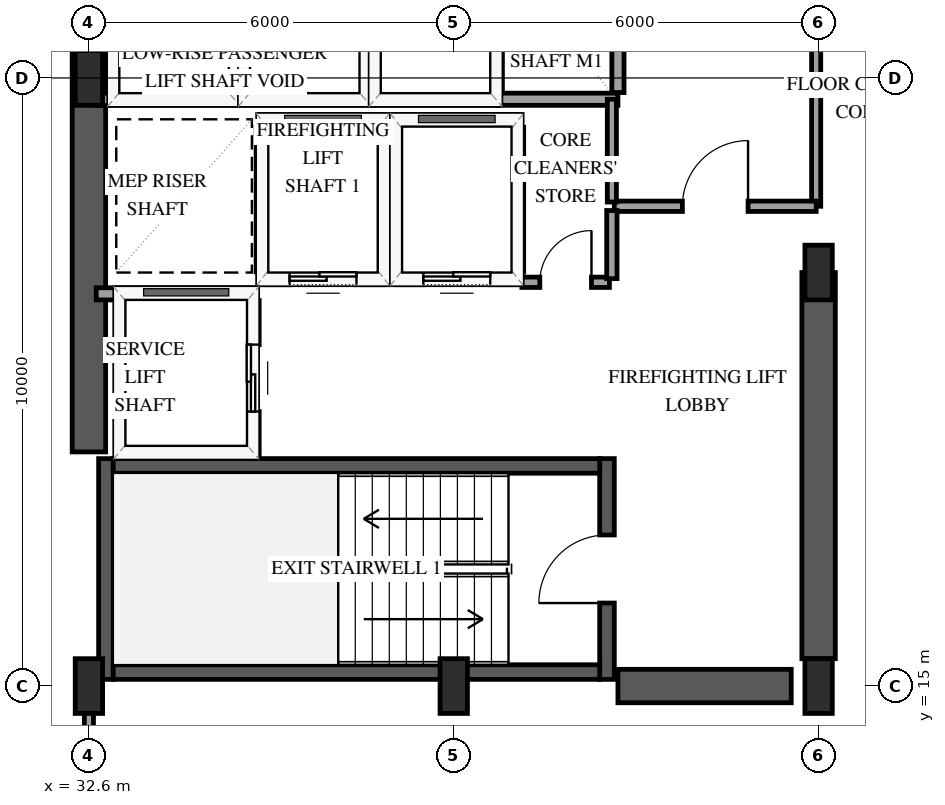
"""IFC4 building model, lengths in metres.
Left out: names, types, materials, properties, quantities, classifications, styles, units other than length and angle.
Written with IfcOpenShell. Run it as: python <this file> out.ifc"""

import sys

from ifc_helpers import new_model, si_unit, direction, frame, frame_2d, origin, origin_2d, place, context, subcontext, project, spatial, rectangle, extrude, element, fill, save


model = new_model("IFC4")
c1 = context("Model", 3, precision=1e-05, world=origin(), true_north=direction((0.0, 1.0)))
c2 = subcontext(c1, "Body", "Model", "MODEL_VIEW")
j1 = project(units=[si_unit("LENGTHUNIT", "METRE"), si_unit("PLANEANGLEUNIT", "RADIAN")], contexts=[c1])
p1 = place(None, origin())
s1 = spatial("IfcSite", under=j1, at=p1, CompositionType="ELEMENT")
p2 = place(p1, origin())
s2 = spatial("IfcBuilding", under=s1, at=p2, CompositionType="ELEMENT")
p3 = place(p2, frame((0.0, 0.0, 126.4)))
s3 = spatial("IfcBuildingStorey", under=s2, at=p3, CompositionType="ELEMENT", Elevation=126.4)
p4 = place(p3, frame((32.88, 15.11, 0.0), z_axis=(0.0, 0.0, 1.0), x_axis=(0.0, 1.0, 0.0)))
e1 = element("IfcWall", 1, at=p4, inside=s3, PredefinedType="SHEAR", context=c2, shape_type="SweptSolid", body=[
    extrude(rectangle(XDim=3.63, YDim=0.24, at=frame_2d((1.815, 0.0))), origin(), (0.0, 0.0, 1.0), 3.9),
])
p5 = place(p3, frame((41.12, 15.11, 0.0), z_axis=(0.0, 0.0, 1.0), x_axis=(0.0, 1.0, 0.0)))
e2 = element("IfcWall", 2, at=p5, inside=s3, PredefinedType="SHEAR", context=c2, shape_type="SweptSolid", body=[
    extrude(rectangle(XDim=3.63, YDim=0.24, at=frame_2d((1.815, 0.0))), origin(), (0.0, 0.0, 1.0), 3.9),
])
p6 = place(p5, frame((1.255, 0.0, 0.0)))
e3 = element("IfcOpeningElement", 3, at=p6, cuts=e2, PredefinedType="OPENING", context=c2, shape_type="SweptSolid", body=[
    extrude(rectangle(XDim=1.12, YDim=2.15, at=frame_2d((0.56, 1.075))), frame((0.0, 0.13, 0.0), z_axis=(0.0, -1.0, 0.0), x_axis=(1.0, 0.0, 0.0)), (0.0, 0.0, 1.0), 0.26),
])
for number, where, z_axis, x_axis in (
    (4, (33.0, 15.23, 0.0), (0.0, 0.0, 1.0), (1.0, 0.0, 0.0)),
    (5, (33.0, 18.62, 0.0), (0.0, 0.0, 1.0), (1.0, 0.0, 0.0)),
):
    element("IfcWall", number, at=place(p3, frame(where, z_axis=z_axis, x_axis=x_axis)), inside=s3, PredefinedType="SHEAR", context=c2, shape_type="SweptSolid", body=[
        extrude(rectangle(XDim=8.0, YDim=0.24, at=frame_2d((4.0, 0.0))), origin(), (0.0, 0.0, 1.0), 3.9),
    ])
p7 = place(p3, frame((32.6, 18.85, 0.0), z_axis=(0.0, 0.0, 1.0), x_axis=(0.0, 1.0, 0.0)))
e6 = element("IfcWall", 6, at=p7, inside=s3, PredefinedType="SHEAR", context=c2, shape_type="SweptSolid", body=[
    extrude(rectangle(XDim=12.3, YDim=0.55, at=frame_2d((6.15, 0.0))), origin(), (0.0, 0.0, 1.0), 3.9),
])
p8 = place(p3, frame((41.3, 15.0, 0.0), z_axis=(0.0, 0.0, 1.0), x_axis=(1.0, 0.0, 0.0)))
e7 = element("IfcWall", 7, at=p8, inside=s3, PredefinedType="SHEAR", context=c2, shape_type="SweptSolid", body=[
    extrude(rectangle(XDim=2.85, YDim=0.55, at=frame_2d((1.425, 0.0))), origin(), (0.0, 0.0, 1.0), 3.9),
])
p9 = place(p3, frame((44.6, 15.45, 0.0), z_axis=(0.0, 0.0, 1.0), x_axis=(0.0, 1.0, 0.0)))
e8 = element("IfcWall", 8, at=p9, inside=s3, PredefinedType="SHEAR", context=c2, shape_type="SweptSolid", body=[
    extrude(rectangle(XDim=6.35, YDim=0.55, at=frame_2d((3.175, 0.0))), origin(), (0.0, 0.0, 1.0), 3.9),
])
for number, where, z_axis, x_axis in (
    (9, (32.6, 15.0, 0.0), (0.0, 0.0, 1.0), (1.0, 0.0, 0.0)),
    (10, (32.6, 25.0, 0.0), (0.0, 0.0, 1.0), (1.0, 0.0, 0.0)),
    (11, (38.6, 15.0, 0.0), (0.0, 0.0, 1.0), (1.0, 0.0, 0.0)),
    (12, (44.6, 15.0, 0.0), (0.0, 0.0, 1.0), (1.0, 0.0, 0.0)),
    (13, (44.6, 21.8, 0.0), (0.0, 0.0, 1.0), (1.0, 0.0, 0.0)),
):
    element("IfcColumn", number, at=place(p3, frame(where, z_axis=z_axis, x_axis=x_axis)), inside=s3, PredefinedType="PILASTER", context=c2, shape_type="SweptSolid", body=[
        extrude(rectangle(XDim=0.45, YDim=0.9, at=origin_2d()), origin(), (0.0, 0.0, 1.0), 3.9),
    ])
p10 = place(p3, frame((35.45, 21.7, 0.0), z_axis=(0.0, 0.0, 1.0), x_axis=(1.0, 0.0, 0.0)))
e14 = element("IfcWall", 14, at=p10, inside=s3, PredefinedType="SOLIDWALL", context=c2, shape_type="SweptSolid", body=[
    extrude(rectangle(XDim=2.0, YDim=0.2, at=frame_2d((1.0, 0.0))), origin(), (0.0, 0.0, 1.0), 3.6),
])
p11 = place(p10, frame((0.45, 0.0, 0.0)))
e15 = element("IfcOpeningElement", 15, at=p11, cuts=e14, PredefinedType="OPENING", context=c2, shape_type="SweptSolid", body=[
    extrude(rectangle(XDim=1.1, YDim=2.15, at=frame_2d((0.55, 1.075))), frame((0.0, 0.11, 0.0), z_axis=(0.0, -1.0, 0.0), x_axis=(1.0, 0.0, 0.0)), (0.0, 0.0, 1.0), 0.22),
])
p12 = place(p3, frame((35.45, 24.3, 0.0), z_axis=(0.0, 0.0, 1.0), x_axis=(1.0, 0.0, 0.0)))
e16 = element("IfcWall", 16, at=p12, inside=s3, PredefinedType="SOLIDWALL", context=c2, shape_type="SweptSolid", body=[
    extrude(rectangle(XDim=2.0, YDim=0.2, at=frame_2d((1.0, 0.0))), origin(), (0.0, 0.0, 1.0), 3.6),
])
for number, where, z_axis, x_axis in (
    (17, (35.45, 21.81, 0.0), (0.0, 0.0, 1.0), (0.0, 1.0, 0.0)),
    (18, (37.45, 21.81, 0.0), (0.0, 0.0, 1.0), (0.0, 1.0, 0.0)),
):
    element("IfcWall", number, at=place(p3, frame(where, z_axis=z_axis, x_axis=x_axis)), inside=s3, PredefinedType="SOLIDWALL", context=c2, shape_type="SweptSolid", body=[
        extrude(rectangle(XDim=2.38, YDim=0.2, at=frame_2d((1.19, 0.0))), origin(), (0.0, 0.0, 1.0), 3.6),
    ])
p13 = place(p3, frame((37.65, 21.7, 0.0), z_axis=(0.0, 0.0, 1.0), x_axis=(1.0, 0.0, 0.0)))
e19 = element("IfcWall", 19, at=p13, inside=s3, PredefinedType="SOLIDWALL", context=c2, shape_type="SweptSolid", body=[
    extrude(rectangle(XDim=2.0, YDim=0.2, at=frame_2d((1.0, 0.0))), origin(), (0.0, 0.0, 1.0), 3.6),
])
p14 = place(p13, frame((0.45, 0.0, 0.0)))
e20 = element("IfcOpeningElement", 20, at=p14, cuts=e19, PredefinedType="OPENING", context=c2, shape_type="SweptSolid", body=[
    extrude(rectangle(XDim=1.1, YDim=2.15, at=frame_2d((0.55, 1.075))), frame((0.0, 0.11, 0.0), z_axis=(0.0, -1.0, 0.0), x_axis=(1.0, 0.0, 0.0)), (0.0, 0.0, 1.0), 0.22),
])
p15 = place(p3, frame((37.65, 24.3, 0.0), z_axis=(0.0, 0.0, 1.0), x_axis=(1.0, 0.0, 0.0)))
e21 = element("IfcWall", 21, at=p15, inside=s3, PredefinedType="SOLIDWALL", context=c2, shape_type="SweptSolid", body=[
    extrude(rectangle(XDim=2.0, YDim=0.2, at=frame_2d((1.0, 0.0))), origin(), (0.0, 0.0, 1.0), 3.6),
])
p16 = place(p3, frame((39.65, 21.81, 0.0), z_axis=(0.0, 0.0, 1.0), x_axis=(0.0, 1.0, 0.0)))
e22 = element("IfcWall", 22, at=p16, inside=s3, PredefinedType="SOLIDWALL", context=c2, shape_type="SweptSolid", body=[
    extrude(rectangle(XDim=2.38, YDim=0.2, at=frame_2d((1.19, 0.0))), origin(), (0.0, 0.0, 1.0), 3.6),
])
p17 = place(p3, frame((32.72, 21.45, 0.0), z_axis=(0.0, 0.0, 1.0), x_axis=(1.0, 0.0, 0.0)))
e23 = element("IfcWall", 23, at=p17, inside=s3, PredefinedType="SOLIDWALL", context=c2, shape_type="SweptSolid", body=[
    extrude(rectangle(XDim=2.58, YDim=0.2, at=frame_2d((1.29, 0.0))), origin(), (0.0, 0.0, 1.0), 3.6),
])
p18 = place(p3, frame((35.3, 18.79, 0.0), z_axis=(0.0, 0.0, 1.0), x_axis=(0.0, 1.0, 0.0)))
e24 = element("IfcWall", 24, at=p18, inside=s3, PredefinedType="SOLIDWALL", context=c2, shape_type="SweptSolid", body=[
    extrude(rectangle(XDim=2.55, YDim=0.2, at=frame_2d((1.275, 0.0))), origin(), (0.0, 0.0, 1.0), 3.6),
])
p19 = place(p18, frame((0.725, 0.0, 0.0)))
e25 = element("IfcOpeningElement", 25, at=p19, cuts=e24, PredefinedType="OPENING", context=c2, shape_type="SweptSolid", body=[
    extrude(rectangle(XDim=1.1, YDim=2.15, at=frame_2d((0.55, 1.075))), frame((0.0, 0.11, 0.0), z_axis=(0.0, -1.0, 0.0), x_axis=(1.0, 0.0, 0.0)), (0.0, 0.0, 1.0), 0.22),
])
p20 = place(p3, frame((32.72, 24.65, 0.0), z_axis=(0.0, 0.0, 1.0), x_axis=(1.0, 0.0, 0.0)))
e26 = element("IfcWall", 26, at=p20, inside=s3, PredefinedType="SOLIDWALL", context=c2, shape_type="SweptSolid", body=[
    extrude(rectangle(XDim=2.28, YDim=0.2, at=frame_2d((1.14, 0.0))), origin(), (0.0, 0.0, 1.0), 3.6),
])
p21 = place(p3, frame((35.0, 24.76, 0.0), z_axis=(0.0, 0.0, 1.0), x_axis=(0.0, 1.0, 0.0)))
e27 = element("IfcWall", 27, at=p21, inside=s3, PredefinedType="SOLIDWALL", context=c2, shape_type="SweptSolid", body=[
    extrude(rectangle(XDim=2.08, YDim=0.2, at=frame_2d((1.04, 0.0))), origin(), (0.0, 0.0, 1.0), 3.6),
])
p22 = place(p3, frame((35.15, 24.65, 0.0), z_axis=(0.0, 0.0, 1.0), x_axis=(1.0, 0.0, 0.0)))
e28 = element("IfcWall", 28, at=p22, inside=s3, PredefinedType="SOLIDWALL", context=c2, shape_type="SweptSolid", body=[
    extrude(rectangle(XDim=2.0, YDim=0.2, at=frame_2d((1.0, 0.0))), origin(), (0.0, 0.0, 1.0), 3.6),
])
p23 = place(p3, frame((37.15, 24.76, 0.0), z_axis=(0.0, 0.0, 1.0), x_axis=(0.0, 1.0, 0.0)))
e29 = element("IfcWall", 29, at=p23, inside=s3, PredefinedType="SOLIDWALL", context=c2, shape_type="SweptSolid", body=[
    extrude(rectangle(XDim=2.08, YDim=0.2, at=frame_2d((1.04, 0.0))), origin(), (0.0, 0.0, 1.0), 3.6),
])
p24 = place(p3, frame((37.3, 24.65, 0.0), z_axis=(0.0, 0.0, 1.0), x_axis=(1.0, 0.0, 0.0)))
e30 = element("IfcWall", 30, at=p24, inside=s3, PredefinedType="SOLIDWALL", context=c2, shape_type="SweptSolid", body=[
    extrude(rectangle(XDim=2.0, YDim=0.2, at=frame_2d((1.0, 0.0))), origin(), (0.0, 0.0, 1.0), 3.6),
])
p25 = place(p3, frame((39.3, 24.76, 0.0), z_axis=(0.0, 0.0, 1.0), x_axis=(0.0, 1.0, 0.0)))
e31 = element("IfcWall", 31, at=p25, inside=s3, PredefinedType="SOLIDWALL", context=c2, shape_type="SweptSolid", body=[
    extrude(rectangle(XDim=2.08, YDim=0.2, at=frame_2d((1.04, 0.0))), origin(), (0.0, 0.0, 1.0), 3.6),
])
p26 = place(p3, frame((39.3, 24.65, 0.0), z_axis=(0.0, 0.0, 1.0), x_axis=(1.0, 0.0, 0.0)))
e32 = element("IfcWall", 32, at=p26, inside=s3, PredefinedType="SOLIDWALL", context=c2, shape_type="SweptSolid", body=[
    extrude(rectangle(XDim=2.0, YDim=0.2, at=frame_2d((1.0, 0.0))), origin(), (0.0, 0.0, 1.0), 3.6),
])
p27 = place(p3, frame((41.3, 24.76, 0.0), z_axis=(0.0, 0.0, 1.0), x_axis=(0.0, 1.0, 0.0)))
e33 = element("IfcWall", 33, at=p27, inside=s3, PredefinedType="SOLIDWALL", context=c2, shape_type="SweptSolid", body=[
    extrude(rectangle(XDim=2.08, YDim=0.2, at=frame_2d((1.04, 0.0))), origin(), (0.0, 0.0, 1.0), 3.6),
])
p28 = place(p3, frame((44.56, 29.8, 0.0), z_axis=(0.0, 0.0, 1.0), x_axis=(0.0, -1.0, 0.0)))
e34 = element("IfcWall", 34, at=p28, inside=s3, PredefinedType="PARTITIONING", context=c2, shape_type="SweptSolid", body=[
    extrude(rectangle(XDim=6.91, YDim=0.15, at=frame_2d((3.455, 0.0))), origin(), (0.0, 0.0, 1.0), 2.64),
])
p29 = place(p28, frame((2.915, 0.0, 0.0)))
e35 = element("IfcOpeningElement", 35, at=p29, cuts=e34, PredefinedType="OPENING", context=c2, shape_type="SweptSolid", body=[
    extrude(rectangle(XDim=1.08, YDim=2.15, at=frame_2d((0.54, 1.075))), frame((0.0, 0.085, 0.0), z_axis=(0.0, -1.0, 0.0), x_axis=(1.0, 0.0, 0.0)), (0.0, 0.0, 1.0), 0.17),
])
p30 = place(p3, frame((41.24, 22.89, 0.0), z_axis=(0.0, 0.0, 1.0), x_axis=(1.0, 0.0, 0.0)))
e36 = element("IfcWall", 36, at=p30, inside=s3, PredefinedType="PARTITIONING", context=c2, shape_type="SweptSolid", body=[
    extrude(rectangle(XDim=3.32, YDim=0.17, at=frame_2d((1.66, 0.0))), origin(), (0.0, 0.0, 1.0), 3.6),
])
p31 = place(p30, frame((1.12, 0.0, 0.0)))
e37 = element("IfcOpeningElement", 37, at=p31, cuts=e36, PredefinedType="OPENING", context=c2, shape_type="SweptSolid", body=[
    extrude(rectangle(XDim=1.08, YDim=2.15, at=frame_2d((0.54, 1.075))), frame((0.0, 0.095, 0.0), z_axis=(0.0, -1.0, 0.0), x_axis=(1.0, 0.0, 0.0)), (0.0, 0.0, 1.0), 0.19),
])
p32 = place(p3, frame((32.6, 12.352, 0.0), z_axis=(0.0, 0.0, 1.0), x_axis=(0.0, 1.0, 0.0)))
e38 = element("IfcWall", 38, at=p32, inside=s3, PredefinedType="PARTITIONING", context=c2, shape_type="SweptSolid", body=[
    extrude(rectangle(XDim=2.578, YDim=0.15, at=frame_2d((1.289, 0.0))), origin(), (0.0, 0.0, 1.0), 3.6),
])
p33 = place(p3, frame((41.2, 22.96, 0.0), z_axis=(0.0, 0.0, 1.0), x_axis=(0.0, 1.0, 0.0)))
e39 = element("IfcWall", 39, at=p33, inside=s3, PredefinedType="PARTITIONING", context=c2, shape_type="SweptSolid", body=[
    extrude(rectangle(XDim=1.69, YDim=0.15, at=frame_2d((0.845, 0.0))), origin(), (0.0, 0.0, 1.0), 3.6),
])
p34 = place(p3, frame((39.72, 21.64, 0.0), z_axis=(0.0, 0.0, 1.0), x_axis=(1.0, 0.0, 0.0)))
e40 = element("IfcWall", 40, at=p34, inside=s3, PredefinedType="PARTITIONING", context=c2, shape_type="SweptSolid", body=[
    extrude(rectangle(XDim=1.44, YDim=0.17, at=frame_2d((0.72, 0.0))), origin(), (0.0, 0.0, 1.0), 3.6),
])
p35 = place(p34, frame((0.295, 0.0, 0.0)))
e41 = element("IfcOpeningElement", 41, at=p35, cuts=e40, PredefinedType="OPENING", context=c2, shape_type="SweptSolid", body=[
    extrude(rectangle(XDim=0.85, YDim=2.1, at=frame_2d((0.425, 1.05))), frame((0.0, 0.095, 0.0), z_axis=(0.0, -1.0, 0.0), x_axis=(1.0, 0.0, 0.0)), (0.0, 0.0, 1.0), 0.19),
])
p36 = place(p3, frame((41.2, 21.7, 0.0), z_axis=(0.0, 0.0, 1.0), x_axis=(0.0, 1.0, 0.0)))
e42 = element("IfcWall", 42, at=p36, inside=s3, PredefinedType="PARTITIONING", context=c2, shape_type="SweptSolid", body=[
    extrude(rectangle(XDim=1.12, YDim=0.17, at=frame_2d((0.56, 0.0))), origin(), (0.0, 0.0, 1.0), 3.6),
])
p37 = place(p11, origin())
e43 = element("IfcDoor", 43, at=p37, inside=s3, OperationType="SLIDING_TO_LEFT", PredefinedType="DOOR", context=c2, shape_type="SweptSolid", body=[
    extrude(rectangle(XDim=1.1, YDim=2.15, at=frame_2d((0.55, 1.075))), frame((0.0, 0.025, 0.0), z_axis=(0.0, -1.0, 0.0), x_axis=(1.0, 0.0, 0.0)), (0.0, 0.0, 1.0), 0.05),
])
fill(e15, e43)
p38 = place(p14, origin())
e44 = element("IfcDoor", 44, at=p38, inside=s3, OperationType="SLIDING_TO_LEFT", PredefinedType="DOOR", context=c2, shape_type="SweptSolid", body=[
    extrude(rectangle(XDim=1.1, YDim=2.15, at=frame_2d((0.55, 1.075))), frame((0.0, 0.025, 0.0), z_axis=(0.0, -1.0, 0.0), x_axis=(1.0, 0.0, 0.0)), (0.0, 0.0, 1.0), 0.05),
])
fill(e20, e44)
p39 = place(p19, origin())
e45 = element("IfcDoor", 45, at=p39, inside=s3, OperationType="SLIDING_TO_LEFT", PredefinedType="DOOR", context=c2, shape_type="SweptSolid", body=[
    extrude(rectangle(XDim=1.1, YDim=2.15, at=frame_2d((0.55, 1.075))), frame((0.0, 0.025, 0.0), z_axis=(0.0, -1.0, 0.0), x_axis=(1.0, 0.0, 0.0)), (0.0, 0.0, 1.0), 0.05),
])
fill(e25, e45)
p40 = place(p6, origin())
e46 = element("IfcDoor", 46, at=p40, inside=s3, OperationType="SINGLE_SWING_LEFT", PredefinedType="DOOR", context=c2, shape_type="SweptSolid", body=[
    extrude(rectangle(XDim=1.12, YDim=2.15, at=frame_2d((0.56, 1.075))), frame((0.0, 0.025, 0.0), z_axis=(0.0, -1.0, 0.0), x_axis=(1.0, 0.0, 0.0)), (0.0, 0.0, 1.0), 0.05),
])
fill(e3, e46)
p41 = place(p31, origin())
e47 = element("IfcDoor", 47, at=p41, inside=s3, OperationType="SINGLE_SWING_RIGHT", PredefinedType="DOOR", context=c2, shape_type="SweptSolid", body=[
    extrude(rectangle(XDim=1.08, YDim=2.15, at=frame_2d((0.54, 1.075))), frame((0.0, 0.025, 0.0), z_axis=(0.0, -1.0, 0.0), x_axis=(1.0, 0.0, 0.0)), (0.0, 0.0, 1.0), 0.05),
])
fill(e37, e47)
p42 = place(p35, origin())
e48 = element("IfcDoor", 48, at=p42, inside=s3, OperationType="SINGLE_SWING_RIGHT", PredefinedType="DOOR", context=c2, shape_type="SweptSolid", body=[
    extrude(rectangle(XDim=0.85, YDim=2.1, at=frame_2d((0.425, 1.05))), frame((0.0, 0.025, 0.0), z_axis=(0.0, -1.0, 0.0), x_axis=(1.0, 0.0, 0.0)), (0.0, 0.0, 1.0), 0.05),
])
fill(e41, e48)
save(model, sys.argv[1])
